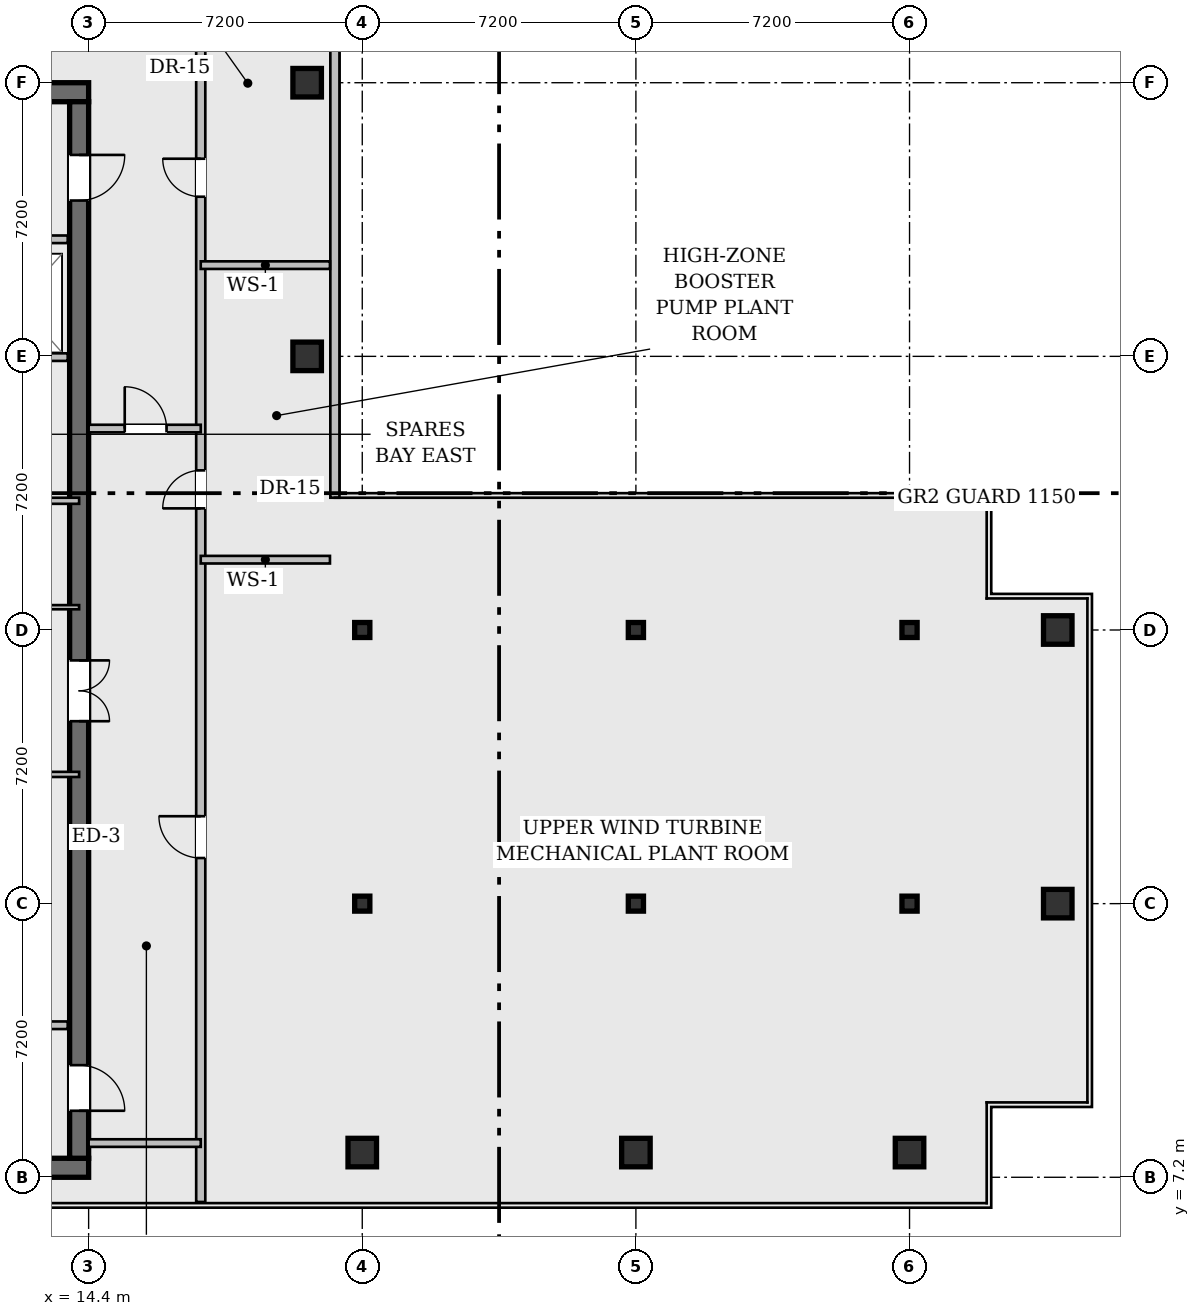
"""IFC4 building model, lengths in metres.
Left out: names, types, materials, properties, quantities, classifications, styles, units other than length and angle.
Written with IfcOpenShell. Run it as: python <this file> out.ifc"""

import sys

from ifc_helpers import new_model, si_unit, direction, frame, frame_2d, origin, origin_2d, place, context, subcontext, project, spatial, rectangle, hollow_rectangle, i_section, extrude, element, fill, save


model = new_model("IFC4")
c1 = context("Model", 3, precision=1e-05, world=origin(), true_north=direction((0.0, 1.0)))
c2 = subcontext(c1, "Body", "Model", "MODEL_VIEW")
j1 = project(units=[si_unit("LENGTHUNIT", "METRE"), si_unit("PLANEANGLEUNIT", "RADIAN")], contexts=[c1])
p1 = place(None, origin())
s1 = spatial("IfcSite", under=j1, at=p1, CompositionType="ELEMENT")
p2 = place(p1, origin())
s2 = spatial("IfcBuilding", under=s1, at=p2, CompositionType="ELEMENT")
p3 = place(p2, frame((0.0, 0.0, 236.95)))
s3 = spatial("IfcBuildingStorey", under=s2, at=p3, CompositionType="ELEMENT", Elevation=236.95)
for number, where, z_axis, x_axis in (
    (1, (0.5, 7.45, 0.0), (0.0, 0.0, 1.0), (1.0, 0.0, 0.0)),
    (2, (0.5, 35.75, 0.0), (0.0, 0.0, 1.0), (1.0, 0.0, 0.0)),
):
    element("IfcWall", number, at=place(p3, frame(where, z_axis=z_axis, x_axis=x_axis)), inside=s3, PredefinedType="SHEAR", context=c2, shape_type="SweptSolid", body=[
        extrude(rectangle(XDim=13.9, YDim=0.5, at=frame_2d((6.95, 0.0))), origin(), (0.0, 0.0, 1.0), 3.94),
    ])
p4 = place(p3, frame((14.15, 35.5, 0.0), z_axis=(0.0, 0.0, 1.0), x_axis=(0.0, -1.0, 0.0)))
e3 = element("IfcWall", 3, at=p4, inside=s3, PredefinedType="SHEAR", context=c2, shape_type="SweptSolid", body=[
    extrude(rectangle(XDim=27.8, YDim=0.5, at=frame_2d((13.9, 0.0))), origin(), (0.0, 0.0, 1.0), 3.94),
])
p5 = place(p4, frame((1.4, 0.0, 0.0)))
e4 = element("IfcOpeningElement", 4, at=p5, cuts=e3, PredefinedType="OPENING", context=c2, shape_type="SweptSolid", body=[
    extrude(rectangle(XDim=1.2, YDim=2.15, at=frame_2d((0.6, 1.075))), frame((0.0, 0.262, 0.0), z_axis=(0.0, -1.0, 0.0), x_axis=(1.0, 0.0, 0.0)), (0.0, 0.0, 1.0), 0.524),
])
p6 = place(p4, frame((25.35, 0.0, 0.0)))
e5 = element("IfcOpeningElement", 5, at=p6, cuts=e3, PredefinedType="OPENING", context=c2, shape_type="SweptSolid", body=[
    extrude(rectangle(XDim=1.2, YDim=2.15, at=frame_2d((0.6, 1.075))), frame((0.0, 0.262, 0.0), z_axis=(0.0, -1.0, 0.0), x_axis=(1.0, 0.0, 0.0)), (0.0, 0.0, 1.0), 0.524),
])
p7 = place(p4, frame((14.7, 0.0, 0.0)))
e6 = element("IfcOpeningElement", 6, at=p7, cuts=e3, PredefinedType="OPENING", context=c2, shape_type="SweptSolid", body=[
    extrude(rectangle(XDim=1.6, YDim=2.2, at=frame_2d((0.8, 1.1))), frame((0.0, 0.262, 0.0), z_axis=(0.0, -1.0, 0.0), x_axis=(1.0, 0.0, 0.0)), (0.0, 0.0, 1.0), 0.524),
])
for number, where, z_axis, x_axis in (
    (7, (20.15, 28.8, 0.0), (0.0, 0.0, 1.0), (1.0, 0.0, 0.0)),
    (8, (20.15, 36.0, 0.0), (0.0, 0.0, 1.0), (1.0, 0.0, 0.0)),
    (9, (21.6, 7.85, 0.0), (0.0, 0.0, 1.0), (1.0, 0.0, 0.0)),
):
    element("IfcColumn", number, at=place(p3, frame(where, z_axis=z_axis, x_axis=x_axis)), inside=s3, PredefinedType="COLUMN", context=c2, shape_type="SweptSolid", body=[
        extrude(hollow_rectangle(XDim=0.75, YDim=0.75, WallThickness=0.045, at=origin_2d()), origin(), (0.0, 0.0, 1.0), 3.94),
    ])
for number, where, z_axis, x_axis in (
    (10, (21.6, 14.4, 0.0), (0.0, 0.0, 1.0), (1.0, 0.0, 0.0)),
    (11, (21.6, 21.6, 0.0), (0.0, 0.0, 1.0), (1.0, 0.0, 0.0)),
):
    element("IfcColumn", number, at=place(p3, frame(where, z_axis=z_axis, x_axis=x_axis)), inside=s3, PredefinedType="COLUMN", context=c2, shape_type="SweptSolid", body=[
        extrude(i_section(OverallWidth=0.399, OverallDepth=0.394, WebThickness=0.023, FlangeThickness=0.037, FilletRadius=0.018, at=origin_2d()), origin(), (0.0, 0.0, 1.0), 3.94),
    ])
p8 = place(p3, frame((28.8, 7.85, 0.0), z_axis=(0.0, 0.0, 1.0), x_axis=(1.0, 0.0, 0.0)))
e12 = element("IfcColumn", 12, at=p8, inside=s3, PredefinedType="COLUMN", context=c2, shape_type="SweptSolid", body=[
    extrude(hollow_rectangle(XDim=0.75, YDim=0.75, WallThickness=0.045, at=origin_2d()), origin(), (0.0, 0.0, 1.0), 3.94),
])
for number, where, z_axis, x_axis in (
    (13, (28.8, 14.4, 0.0), (0.0, 0.0, 1.0), (1.0, 0.0, 0.0)),
    (14, (28.8, 21.6, 0.0), (0.0, 0.0, 1.0), (1.0, 0.0, 0.0)),
):
    element("IfcColumn", number, at=place(p3, frame(where, z_axis=z_axis, x_axis=x_axis)), inside=s3, PredefinedType="COLUMN", context=c2, shape_type="SweptSolid", body=[
        extrude(i_section(OverallWidth=0.399, OverallDepth=0.394, WebThickness=0.023, FlangeThickness=0.037, FilletRadius=0.018, at=origin_2d()), origin(), (0.0, 0.0, 1.0), 3.94),
    ])
p9 = place(p3, frame((36.0, 7.85, 0.0), z_axis=(0.0, 0.0, 1.0), x_axis=(1.0, 0.0, 0.0)))
e15 = element("IfcColumn", 15, at=p9, inside=s3, PredefinedType="COLUMN", context=c2, shape_type="SweptSolid", body=[
    extrude(hollow_rectangle(XDim=0.75, YDim=0.75, WallThickness=0.045, at=origin_2d()), origin(), (0.0, 0.0, 1.0), 3.94),
])
for number, where, z_axis, x_axis in (
    (16, (36.0, 14.4, 0.0), (0.0, 0.0, 1.0), (1.0, 0.0, 0.0)),
    (17, (36.0, 21.6, 0.0), (0.0, 0.0, 1.0), (1.0, 0.0, 0.0)),
):
    element("IfcColumn", number, at=place(p3, frame(where, z_axis=z_axis, x_axis=x_axis)), inside=s3, PredefinedType="COLUMN", context=c2, shape_type="SweptSolid", body=[
        extrude(i_section(OverallWidth=0.399, OverallDepth=0.394, WebThickness=0.023, FlangeThickness=0.037, FilletRadius=0.018, at=origin_2d()), origin(), (0.0, 0.0, 1.0), 3.94),
    ])
for number, where, z_axis, x_axis in (
    (18, (39.9, 14.4, 0.0), (0.0, 0.0, 1.0), (1.0, 0.0, 0.0)),
    (19, (39.9, 21.6, 0.0), (0.0, 0.0, 1.0), (1.0, 0.0, 0.0)),
):
    element("IfcColumn", number, at=place(p3, frame(where, z_axis=z_axis, x_axis=x_axis)), inside=s3, PredefinedType="COLUMN", context=c2, shape_type="SweptSolid", body=[
        extrude(hollow_rectangle(XDim=0.75, YDim=0.75, WallThickness=0.045, at=origin_2d()), origin(), (0.0, 0.0, 1.0), 3.94),
    ])
p10 = place(p3, frame((20.88, 37.23, 0.0), z_axis=(0.0, 0.0, 1.0), x_axis=(0.0, -1.0, 0.0)))
e20 = element("IfcWall", 20, at=p10, inside=s3, PredefinedType="STANDARD", context=c2, shape_type="SweptSolid", body=[
    extrude(rectangle(XDim=12.15, YDim=0.24, at=frame_2d((6.075, 0.0))), origin(), (0.0, 0.0, 1.0), 3.94),
])
p11 = place(p3, frame((8.7, 31.88, 0.0), z_axis=(0.0, 0.0, 1.0), x_axis=(1.0, 0.0, 0.0)))
e21 = element("IfcWall", 21, at=p11, inside=s3, PredefinedType="PARTITIONING", context=c2, shape_type="SweptSolid", body=[
    extrude(rectangle(XDim=5.15, YDim=0.2, at=frame_2d((2.575, 0.0))), origin(), (0.0, 0.0, 1.0), 3.94),
])
p12 = place(p11, frame((0.75, 0.0, 0.0)))
e22 = element("IfcOpeningElement", 22, at=p12, cuts=e21, PredefinedType="OPENING", context=c2, shape_type="SweptSolid", body=[
    extrude(rectangle(XDim=1.2, YDim=2.2, at=frame_2d((0.6, 1.1))), frame((0.0, 0.112, 0.0), z_axis=(0.0, -1.0, 0.0), x_axis=(1.0, 0.0, 0.0)), (0.0, 0.0, 1.0), 0.224),
])
p13 = place(p11, frame((3.25, 0.0, 0.0)))
e23 = element("IfcOpeningElement", 23, at=p13, cuts=e21, PredefinedType="OPENING", context=c2, shape_type="SweptSolid", body=[
    extrude(rectangle(XDim=1.2, YDim=2.2, at=frame_2d((0.6, 1.1))), frame((0.0, 0.112, 0.0), z_axis=(0.0, -1.0, 0.0), x_axis=(1.0, 0.0, 0.0)), (0.0, 0.0, 1.0), 0.224),
])
for number, where, z_axis, x_axis in (
    (24, (8.7, 11.2, 0.0), (0.0, 0.0, 1.0), (1.0, 0.0, 0.0)),
    (25, (8.7, 28.78, 0.0), (0.0, 0.0, 1.0), (1.0, 0.0, 0.0)),
):
    element("IfcWall", number, at=place(p3, frame(where, z_axis=z_axis, x_axis=x_axis)), inside=s3, PredefinedType="PARTITIONING", context=c2, shape_type="SweptSolid", body=[
        extrude(rectangle(XDim=5.15, YDim=0.2, at=frame_2d((2.575, 0.0))), origin(), (0.0, 0.0, 1.0), 3.94),
    ])
p14 = place(p3, frame((7.1, 22.2, 0.0), z_axis=(0.0, 0.0, 1.0), x_axis=(1.0, 0.0, 0.0)))
e26 = element("IfcWall", 26, at=p14, inside=s3, PredefinedType="PARTITIONING", context=c2, shape_type="SweptSolid", body=[
    extrude(rectangle(XDim=7.05, YDim=0.11, at=frame_2d((3.525, 0.0))), origin(), (0.0, 0.0, 1.0), 3.94),
])
p15 = place(p14, frame((2.4, 0.0, 0.0)))
e27 = element("IfcOpeningElement", 27, at=p15, cuts=e26, PredefinedType="OPENING", context=c2, shape_type="SweptSolid", body=[
    extrude(rectangle(XDim=1.08, YDim=2.15, at=frame_2d((0.54, 1.075))), frame((0.0, 0.067, 0.0), z_axis=(0.0, -1.0, 0.0), x_axis=(1.0, 0.0, 0.0)), (0.0, 0.0, 1.0), 0.134),
])
p16 = place(p3, frame((7.1, 25.0, 0.0), z_axis=(0.0, 0.0, 1.0), x_axis=(1.0, 0.0, 0.0)))
e28 = element("IfcWall", 28, at=p16, inside=s3, PredefinedType="PARTITIONING", context=c2, shape_type="SweptSolid", body=[
    extrude(rectangle(XDim=7.05, YDim=0.16, at=frame_2d((3.525, 0.0))), origin(), (0.0, 0.0, 1.0), 3.94),
])
p17 = place(p3, frame((5.15, 17.8, 0.0), z_axis=(0.0, 0.0, 1.0), x_axis=(1.0, 0.0, 0.0)))
e29 = element("IfcWall", 29, at=p17, inside=s3, PredefinedType="PARTITIONING", context=c2, shape_type="SweptSolid", body=[
    extrude(rectangle(XDim=9.0, YDim=0.135, at=frame_2d((4.5, 0.0))), origin(), (0.0, 0.0, 1.0), 3.94),
])
p18 = place(p17, frame((2.65, 0.0, 0.0)))
e30 = element("IfcOpeningElement", 30, at=p18, cuts=e29, PredefinedType="OPENING", context=c2, shape_type="SweptSolid", body=[
    extrude(rectangle(XDim=0.9, YDim=2.15, at=frame_2d((0.45, 1.075))), frame((0.0, 0.08, 0.0), z_axis=(0.0, -1.0, 0.0), x_axis=(1.0, 0.0, 0.0)), (0.0, 0.0, 1.0), 0.159),
])
p19 = place(p17, frame((6.15, 0.0, 0.0)))
e31 = element("IfcOpeningElement", 31, at=p19, cuts=e29, PredefinedType="OPENING", context=c2, shape_type="SweptSolid", body=[
    extrude(rectangle(XDim=1.08, YDim=2.15, at=frame_2d((0.54, 1.075))), frame((0.0, 0.08, 0.0), z_axis=(0.0, -1.0, 0.0), x_axis=(1.0, 0.0, 0.0)), (0.0, 0.0, 1.0), 0.159),
])
p20 = place(p3, frame((17.35, 6.55, 0.0), z_axis=(0.0, 0.0, 1.0), x_axis=(0.0, 1.0, 0.0)))
e32 = element("IfcWall", 32, at=p20, inside=s3, PredefinedType="STANDARD", context=c2, shape_type="SweptSolid", body=[
    extrude(rectangle(XDim=33.2, YDim=0.24, at=frame_2d((16.6, 0.0))), origin(), (0.0, 0.0, 1.0), 3.376),
])
p21 = place(p20, frame((26.45, 0.0, 0.0)))
e33 = element("IfcOpeningElement", 33, at=p21, cuts=e32, PredefinedType="OPENING", context=c2, shape_type="SweptSolid", body=[
    extrude(rectangle(XDim=1.0, YDim=2.15, at=frame_2d((0.5, 1.075))), frame((0.0, 0.132, 0.0), z_axis=(0.0, -1.0, 0.0), x_axis=(1.0, 0.0, 0.0)), (0.0, 0.0, 1.0), 0.264),
])
p22 = place(p20, frame((18.25, 0.0, 0.0)))
e34 = element("IfcOpeningElement", 34, at=p22, cuts=e32, PredefinedType="OPENING", context=c2, shape_type="SweptSolid", body=[
    extrude(rectangle(XDim=1.0, YDim=2.15, at=frame_2d((0.5, 1.075))), frame((0.0, 0.132, 0.0), z_axis=(0.0, -1.0, 0.0), x_axis=(1.0, 0.0, 0.0)), (0.0, 0.0, 1.0), 0.264),
])
p23 = place(p20, frame((9.05, 0.0, 0.0)))
e35 = element("IfcOpeningElement", 35, at=p23, cuts=e32, PredefinedType="OPENING", context=c2, shape_type="SweptSolid", body=[
    extrude(rectangle(XDim=1.1, YDim=2.15, at=frame_2d((0.55, 1.075))), frame((0.0, 0.132, 0.0), z_axis=(0.0, -1.0, 0.0), x_axis=(1.0, 0.0, 0.0)), (0.0, 0.0, 1.0), 0.264),
])
p24 = place(p3, frame((14.4, 26.9, 0.0), z_axis=(0.0, 0.0, 1.0), x_axis=(1.0, 0.0, 0.0)))
e36 = element("IfcWall", 36, at=p24, inside=s3, PredefinedType="PARTITIONING", context=c2, shape_type="SweptSolid", body=[
    extrude(rectangle(XDim=2.95, YDim=0.2, at=frame_2d((1.475, 0.0))), origin(), (0.0, 0.0, 1.0), 3.508),
])
p25 = place(p24, frame((0.95, 0.0, 0.0)))
e37 = element("IfcOpeningElement", 37, at=p25, cuts=e36, PredefinedType="OPENING", context=c2, shape_type="SweptSolid", body=[
    extrude(rectangle(XDim=1.1, YDim=2.15, at=frame_2d((0.55, 1.075))), frame((0.0, 0.112, 0.0), z_axis=(0.0, -1.0, 0.0), x_axis=(1.0, 0.0, 0.0)), (0.0, 0.0, 1.0), 0.224),
])
p26 = place(p3, frame((17.35, 23.45, 0.0), z_axis=(0.0, 0.0, 1.0), x_axis=(1.0, 0.0, 0.0)))
e38 = element("IfcWall", 38, at=p26, inside=s3, PredefinedType="PARTITIONING", context=c2, shape_type="SweptSolid", body=[
    extrude(rectangle(XDim=3.4, YDim=0.2, at=frame_2d((1.7, 0.0))), origin(), (0.0, 0.0, 1.0), 3.508),
])
p27 = place(p3, frame((14.4, 8.1, 0.0), z_axis=(0.0, 0.0, 1.0), x_axis=(1.0, 0.0, 0.0)))
e39 = element("IfcWall", 39, at=p27, inside=s3, PredefinedType="PARTITIONING", context=c2, shape_type="SweptSolid", body=[
    extrude(rectangle(XDim=2.95, YDim=0.2, at=frame_2d((1.475, 0.0))), origin(), (0.0, 0.0, 1.0), 3.94),
])
p28 = place(p3, frame((17.35, 31.2, 0.0), z_axis=(0.0, 0.0, 1.0), x_axis=(1.0, 0.0, 0.0)))
e40 = element("IfcWall", 40, at=p28, inside=s3, PredefinedType="PARTITIONING", context=c2, shape_type="SweptSolid", body=[
    extrude(rectangle(XDim=3.4, YDim=0.2, at=frame_2d((1.7, 0.0))), origin(), (0.0, 0.0, 1.0), 3.508),
])
p29 = place(p5, origin())
e41 = element("IfcDoor", 41, at=p29, inside=s3, OperationType="SINGLE_SWING_LEFT", PredefinedType="DOOR", context=c2, shape_type="SweptSolid", body=[
    extrude(rectangle(XDim=1.2, YDim=2.15, at=frame_2d((0.6, 1.075))), frame((0.0, 0.025, 0.0), z_axis=(0.0, -1.0, 0.0), x_axis=(1.0, 0.0, 0.0)), (0.0, 0.0, 1.0), 0.05),
])
fill(e4, e41)
p30 = place(p6, origin())
e42 = element("IfcDoor", 42, at=p30, inside=s3, OperationType="SINGLE_SWING_RIGHT", PredefinedType="DOOR", context=c2, shape_type="SweptSolid", body=[
    extrude(rectangle(XDim=1.2, YDim=2.15, at=frame_2d((0.6, 1.075))), frame((0.0, 0.025, 0.0), z_axis=(0.0, -1.0, 0.0), x_axis=(1.0, 0.0, 0.0)), (0.0, 0.0, 1.0), 0.05),
])
fill(e5, e42)
p31 = place(p7, origin())
e43 = element("IfcDoor", 43, at=p31, inside=s3, OperationType="DOUBLE_DOOR_SINGLE_SWING", PredefinedType="DOOR", context=c2, shape_type="SweptSolid", body=[
    extrude(rectangle(XDim=1.6, YDim=2.2, at=frame_2d((0.8, 1.1))), frame((0.0, 0.025, 0.0), z_axis=(0.0, -1.0, 0.0), x_axis=(1.0, 0.0, 0.0)), (0.0, 0.0, 1.0), 0.05),
])
fill(e6, e43)
p32 = place(p25, origin())
e44 = element("IfcDoor", 44, at=p32, inside=s3, OperationType="SINGLE_SWING_LEFT", PredefinedType="DOOR", context=c2, shape_type="SweptSolid", body=[
    extrude(rectangle(XDim=1.1, YDim=2.15, at=frame_2d((0.55, 1.075))), frame((0.0, 0.025, 0.0), z_axis=(0.0, -1.0, 0.0), x_axis=(1.0, 0.0, 0.0)), (0.0, 0.0, 1.0), 0.05),
])
fill(e37, e44)
p33 = place(p21, origin())
e45 = element("IfcDoor", 45, at=p33, inside=s3, OperationType="SINGLE_SWING_RIGHT", PredefinedType="DOOR", context=c2, shape_type="SweptSolid", body=[
    extrude(rectangle(XDim=1.0, YDim=2.15, at=frame_2d((0.5, 1.075))), frame((0.0, 0.025, 0.0), z_axis=(0.0, -1.0, 0.0), x_axis=(1.0, 0.0, 0.0)), (0.0, 0.0, 1.0), 0.05),
])
fill(e33, e45)
p34 = place(p22, origin())
e46 = element("IfcDoor", 46, at=p34, inside=s3, OperationType="SINGLE_SWING_LEFT", PredefinedType="DOOR", context=c2, shape_type="SweptSolid", body=[
    extrude(rectangle(XDim=1.0, YDim=2.15, at=frame_2d((0.5, 1.075))), frame((0.0, 0.025, 0.0), z_axis=(0.0, -1.0, 0.0), x_axis=(1.0, 0.0, 0.0)), (0.0, 0.0, 1.0), 0.05),
])
fill(e34, e46)
p35 = place(p23, origin())
e47 = element("IfcDoor", 47, at=p35, inside=s3, OperationType="SINGLE_SWING_RIGHT", PredefinedType="DOOR", context=c2, shape_type="SweptSolid", body=[
    extrude(rectangle(XDim=1.1, YDim=2.15, at=frame_2d((0.55, 1.075))), frame((0.0, 0.025, 0.0), z_axis=(0.0, -1.0, 0.0), x_axis=(1.0, 0.0, 0.0)), (0.0, 0.0, 1.0), 0.05),
])
fill(e35, e47)
save(model, sys.argv[1])
